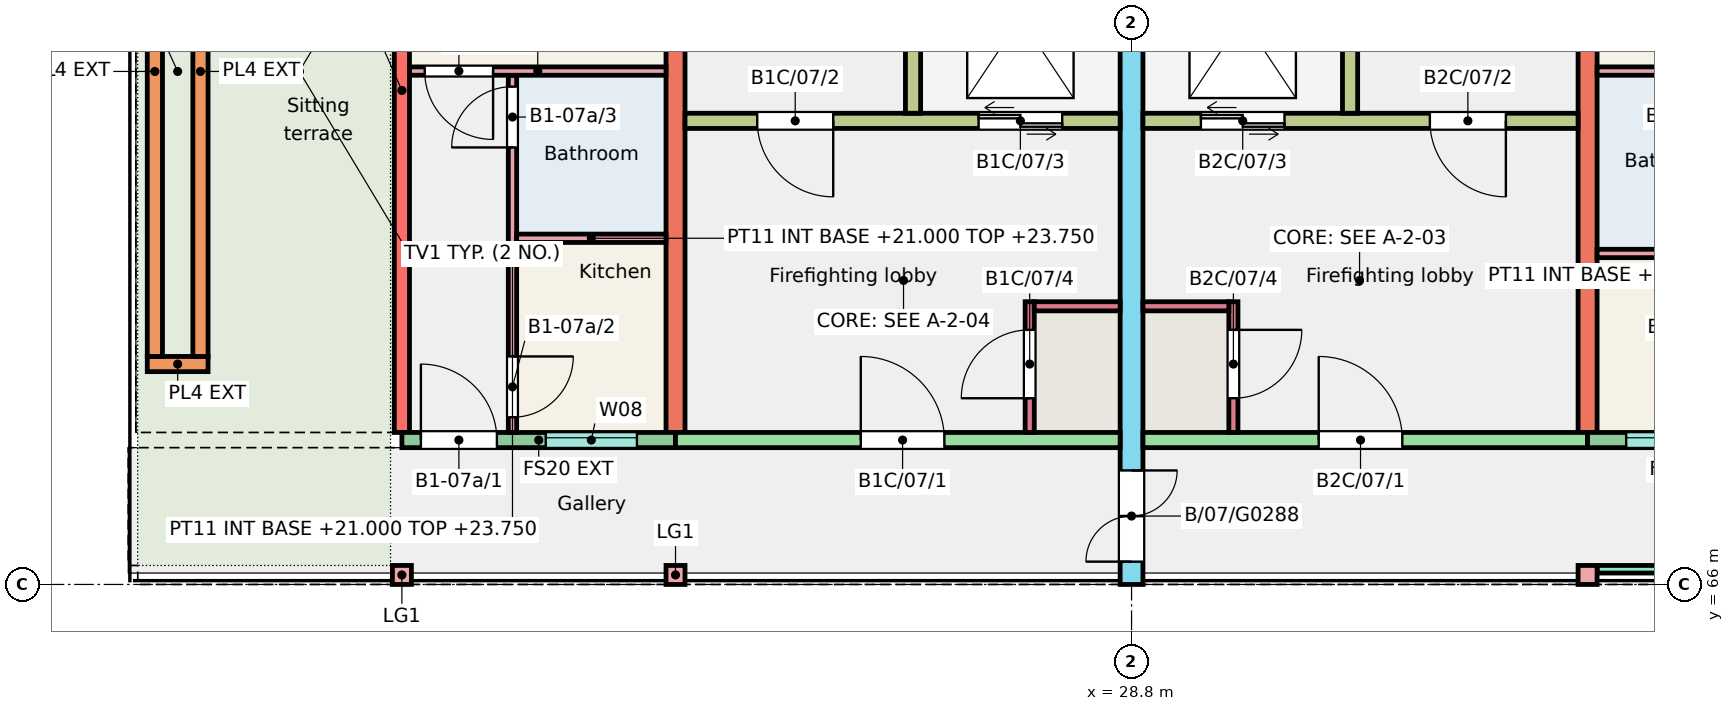
"""IFC4 building model, lengths in metres.
Left out: names, types, materials, properties, quantities, classifications, styles, units other than length and angle.
Written with IfcOpenShell. Run it as: python <this file> out.ifc"""

import sys

from ifc_helpers import new_model, si_unit, direction, frame, frame_2d, origin, origin_2d, place, context, subcontext, project, spatial, rectangle, extrude, element, fill, save


model = new_model("IFC4")
c1 = context("Model", 3, precision=1e-05, world=origin(), true_north=direction((0.0, 1.0)))
c2 = subcontext(c1, "Body", "Model", "MODEL_VIEW")
j1 = project(units=[si_unit("LENGTHUNIT", "METRE"), si_unit("PLANEANGLEUNIT", "RADIAN")], contexts=[c1])
p1 = place(None, origin())
s1 = spatial("IfcSite", under=j1, at=p1, CompositionType="ELEMENT")
p2 = place(p1, origin())
s2 = spatial("IfcBuilding", under=s1, at=p2, CompositionType="ELEMENT")
p3 = place(p2, frame((0.0, 0.0, 21.0)))
s3 = spatial("IfcBuildingStorey", under=s2, at=p3, CompositionType="ELEMENT", Elevation=21.0)
p4 = place(p3, frame((19.2, 68.0, 0.0), z_axis=(0.0, 0.0, 1.0), x_axis=(0.0, 1.0, 0.0)))
e1 = element("IfcWall", 1, at=p4, inside=s3, PredefinedType="SHEAR", context=c2, shape_type="SweptSolid", body=[
    extrude(rectangle(XDim=9.0, YDim=0.2, at=frame_2d((4.5, 0.0))), origin(), (0.0, 0.0, 1.0), 3.0),
])
p5 = place(p4, frame((7.653, 0.0, 0.9)))
e2 = element("IfcOpeningElement", 2, at=p5, cuts=e1, PredefinedType="OPENING", context=c2, shape_type="SweptSolid", body=[
    extrude(rectangle(XDim=1.2, YDim=1.5, at=frame_2d((0.6, 0.75))), frame((0.0, 0.11, 0.0), z_axis=(0.0, -1.0, 0.0), x_axis=(1.0, 0.0, 0.0)), (0.0, 0.0, 1.0), 0.22),
])
p6 = place(p4, frame((6.405, 0.0, 0.0)))
e3 = element("IfcOpeningElement", 3, at=p6, cuts=e1, PredefinedType="OPENING", context=c2, shape_type="SweptSolid", body=[
    extrude(rectangle(XDim=1.0, YDim=2.1, at=frame_2d((0.5, 1.05))), frame((0.0, 0.11, 0.0), z_axis=(0.0, -1.0, 0.0), x_axis=(1.0, 0.0, 0.0)), (0.0, 0.0, 1.0), 0.22),
])
p7 = place(p3, frame((22.8, 68.0, 0.0), z_axis=(0.0, 0.0, 1.0), x_axis=(0.0, 1.0, 0.0)))
e4 = element("IfcWall", 4, at=p7, inside=s3, PredefinedType="SHEAR", context=c2, shape_type="SweptSolid", body=[
    extrude(rectangle(XDim=9.0, YDim=0.25, at=frame_2d((4.5, 0.0))), origin(), (0.0, 0.0, 1.0), 3.0),
])
p8 = place(p3, frame((28.8, 66.0, 0.0), z_axis=(0.0, 0.0, 1.0), x_axis=(0.0, 1.0, 0.0)))
e5 = element("IfcWall", 5, at=p8, inside=s3, PredefinedType="SHEAR", context=c2, shape_type="SweptSolid", body=[
    extrude(rectangle(XDim=11.0, YDim=0.3, at=frame_2d((5.5, 0.0))), origin(), (0.0, 0.0, 1.0), 3.0),
])
p9 = place(p8, frame((0.3, 0.0, 0.0)))
e6 = element("IfcOpeningElement", 6, at=p9, cuts=e5, PredefinedType="OPENING", context=c2, shape_type="SweptSolid", body=[
    extrude(rectangle(XDim=1.2, YDim=2.1, at=frame_2d((0.6, 1.05))), frame((0.0, 0.16, 0.0), z_axis=(0.0, -1.0, 0.0), x_axis=(1.0, 0.0, 0.0)), (0.0, 0.0, 1.0), 0.32),
])
p10 = place(p3, frame((34.8, 68.0, 0.0), z_axis=(0.0, 0.0, 1.0), x_axis=(0.0, 1.0, 0.0)))
e7 = element("IfcWall", 7, at=p10, inside=s3, PredefinedType="SHEAR", context=c2, shape_type="SweptSolid", body=[
    extrude(rectangle(XDim=9.0, YDim=0.25, at=frame_2d((4.5, 0.0))), origin(), (0.0, 0.0, 1.0), 3.0),
])
p11 = place(p3, frame((19.2, 67.9, 0.0), z_axis=(0.0, 0.0, 1.0), x_axis=(1.0, 0.0, 0.0)))
e8 = element("IfcWall", 8, at=p11, inside=s3, PredefinedType="SOLIDWALL", context=c2, shape_type="SweptSolid", body=[
    extrude(rectangle(XDim=3.6, YDim=0.2, at=frame_2d((1.8, 0.0))), origin(), (0.0, 0.0, 1.0), 3.0),
])
p12 = place(p11, frame((1.893, 0.0, 1.1)))
e9 = element("IfcOpeningElement", 9, at=p12, cuts=e8, PredefinedType="OPENING", context=c2, shape_type="SweptSolid", body=[
    extrude(rectangle(XDim=1.2, YDim=1.3, at=frame_2d((0.6, 0.65))), frame((0.0, 0.11, 0.0), z_axis=(0.0, -1.0, 0.0), x_axis=(1.0, 0.0, 0.0)), (0.0, 0.0, 1.0), 0.22),
])
p13 = place(p11, frame((0.25, 0.0, 0.0)))
e10 = element("IfcOpeningElement", 10, at=p13, cuts=e8, PredefinedType="OPENING", context=c2, shape_type="SweptSolid", body=[
    extrude(rectangle(XDim=1.0, YDim=2.1, at=frame_2d((0.5, 1.05))), frame((0.0, 0.11, 0.0), z_axis=(0.0, -1.0, 0.0), x_axis=(1.0, 0.0, 0.0)), (0.0, 0.0, 1.0), 0.22),
])
p14 = place(p3, frame((22.8, 67.9, 0.0), z_axis=(0.0, 0.0, 1.0), x_axis=(1.0, 0.0, 0.0)))
e11 = element("IfcWall", 11, at=p14, inside=s3, PredefinedType="SHEAR", context=c2, shape_type="SweptSolid", body=[
    extrude(rectangle(XDim=5.85, YDim=0.2, at=frame_2d((2.925, 0.0))), origin(), (0.0, 0.0, 1.0), 3.0),
])
p15 = place(p14, frame((2.438, 0.0, 0.0)))
e12 = element("IfcOpeningElement", 12, at=p15, cuts=e11, PredefinedType="OPENING", context=c2, shape_type="SweptSolid", body=[
    extrude(rectangle(XDim=1.1, YDim=2.1, at=frame_2d((0.55, 1.05))), frame((0.0, 0.11, 0.0), z_axis=(0.0, -1.0, 0.0), x_axis=(1.0, 0.0, 0.0)), (0.0, 0.0, 1.0), 0.22),
])
p16 = place(p3, frame((22.925, 72.1, 0.0), z_axis=(0.0, 0.0, 1.0), x_axis=(1.0, 0.0, 0.0)))
e13 = element("IfcWall", 13, at=p16, inside=s3, PredefinedType="SHEAR", context=c2, shape_type="SweptSolid", body=[
    extrude(rectangle(XDim=5.725, YDim=0.2, at=frame_2d((2.862, 0.0))), origin(), (0.0, 0.0, 1.0), 3.0),
])
p17 = place(p16, frame((0.95, 0.0, 0.0)))
e14 = element("IfcOpeningElement", 14, at=p17, cuts=e13, PredefinedType="OPENING", context=c2, shape_type="SweptSolid", body=[
    extrude(rectangle(XDim=1.0, YDim=2.1, at=frame_2d((0.5, 1.05))), frame((0.0, 0.11, 0.0), z_axis=(0.0, -1.0, 0.0), x_axis=(1.0, 0.0, 0.0)), (0.0, 0.0, 1.0), 0.22),
])
p18 = place(p16, frame((3.863, 0.0, 0.0)))
e15 = element("IfcOpeningElement", 15, at=p18, cuts=e13, PredefinedType="OPENING", context=c2, shape_type="SweptSolid", body=[
    extrude(rectangle(XDim=1.1, YDim=2.1, at=frame_2d((0.55, 1.05))), frame((0.0, 0.11, 0.0), z_axis=(0.0, -1.0, 0.0), x_axis=(1.0, 0.0, 0.0)), (0.0, 0.0, 1.0), 0.22),
])
p19 = place(p3, frame((25.925, 72.2, 0.0), z_axis=(0.0, 0.0, 1.0), x_axis=(0.0, 1.0, 0.0)))
e16 = element("IfcWall", 16, at=p19, inside=s3, PredefinedType="SHEAR", context=c2, shape_type="SweptSolid", body=[
    extrude(rectangle(XDim=4.8, YDim=0.2, at=frame_2d((2.4, 0.0))), origin(), (0.0, 0.0, 1.0), 3.0),
])
p20 = place(p3, frame((27.46, 68.0, 0.0), z_axis=(0.0, 0.0, 1.0), x_axis=(0.0, 1.0, 0.0)))
e17 = element("IfcWall", 17, at=p20, inside=s3, PredefinedType="SHEAR", context=c2, shape_type="SweptSolid", body=[
    extrude(rectangle(XDim=1.72, YDim=0.12, at=frame_2d((0.86, 0.0))), origin(), (0.0, 0.0, 1.0), 3.0),
])
p21 = place(p20, frame((0.45, 0.0, 0.0)))
e18 = element("IfcOpeningElement", 18, at=p21, cuts=e17, PredefinedType="OPENING", context=c2, shape_type="SweptSolid", body=[
    extrude(rectangle(XDim=0.9, YDim=2.1, at=frame_2d((0.45, 1.05))), frame((0.0, 0.07, 0.0), z_axis=(0.0, -1.0, 0.0), x_axis=(1.0, 0.0, 0.0)), (0.0, 0.0, 1.0), 0.14),
])
p22 = place(p3, frame((27.52, 69.66, 0.0), z_axis=(0.0, 0.0, 1.0), x_axis=(1.0, 0.0, 0.0)))
e19 = element("IfcWall", 19, at=p22, inside=s3, PredefinedType="SHEAR", context=c2, shape_type="SweptSolid", body=[
    extrude(rectangle(XDim=1.13, YDim=0.12, at=frame_2d((0.565, 0.0))), origin(), (0.0, 0.0, 1.0), 3.0),
])
p23 = place(p3, frame((28.95, 67.9, 0.0), z_axis=(0.0, 0.0, 1.0), x_axis=(1.0, 0.0, 0.0)))
e20 = element("IfcWall", 20, at=p23, inside=s3, PredefinedType="SHEAR", context=c2, shape_type="SweptSolid", body=[
    extrude(rectangle(XDim=5.85, YDim=0.2, at=frame_2d((2.925, 0.0))), origin(), (0.0, 0.0, 1.0), 3.0),
])
p24 = place(p23, frame((2.312, 0.0, 0.0)))
e21 = element("IfcOpeningElement", 21, at=p24, cuts=e20, PredefinedType="OPENING", context=c2, shape_type="SweptSolid", body=[
    extrude(rectangle(XDim=1.1, YDim=2.1, at=frame_2d((0.55, 1.05))), frame((0.0, 0.11, 0.0), z_axis=(0.0, -1.0, 0.0), x_axis=(1.0, 0.0, 0.0)), (0.0, 0.0, 1.0), 0.22),
])
p25 = place(p3, frame((28.95, 72.1, 0.0), z_axis=(0.0, 0.0, 1.0), x_axis=(1.0, 0.0, 0.0)))
e22 = element("IfcWall", 22, at=p25, inside=s3, PredefinedType="SHEAR", context=c2, shape_type="SweptSolid", body=[
    extrude(rectangle(XDim=5.725, YDim=0.2, at=frame_2d((2.863, 0.0))), origin(), (0.0, 0.0, 1.0), 3.0),
])
p26 = place(p25, frame((3.775, 0.0, 0.0)))
e23 = element("IfcOpeningElement", 23, at=p26, cuts=e22, PredefinedType="OPENING", context=c2, shape_type="SweptSolid", body=[
    extrude(rectangle(XDim=1.0, YDim=2.1, at=frame_2d((0.5, 1.05))), frame((0.0, 0.11, 0.0), z_axis=(0.0, -1.0, 0.0), x_axis=(1.0, 0.0, 0.0)), (0.0, 0.0, 1.0), 0.22),
])
p27 = place(p25, frame((0.762, 0.0, 0.0)))
e24 = element("IfcOpeningElement", 24, at=p27, cuts=e22, PredefinedType="OPENING", context=c2, shape_type="SweptSolid", body=[
    extrude(rectangle(XDim=1.1, YDim=2.1, at=frame_2d((0.55, 1.05))), frame((0.0, 0.11, 0.0), z_axis=(0.0, -1.0, 0.0), x_axis=(1.0, 0.0, 0.0)), (0.0, 0.0, 1.0), 0.22),
])
p28 = place(p3, frame((31.675, 72.2, 0.0), z_axis=(0.0, 0.0, 1.0), x_axis=(0.0, 1.0, 0.0)))
e25 = element("IfcWall", 25, at=p28, inside=s3, PredefinedType="SHEAR", context=c2, shape_type="SweptSolid", body=[
    extrude(rectangle(XDim=4.8, YDim=0.2, at=frame_2d((2.4, 0.0))), origin(), (0.0, 0.0, 1.0), 3.0),
])
p29 = place(p3, frame((30.14, 68.0, 0.0), z_axis=(0.0, 0.0, 1.0), x_axis=(0.0, 1.0, 0.0)))
e26 = element("IfcWall", 26, at=p29, inside=s3, PredefinedType="SHEAR", context=c2, shape_type="SweptSolid", body=[
    extrude(rectangle(XDim=1.72, YDim=0.12, at=frame_2d((0.86, 0.0))), origin(), (0.0, 0.0, 1.0), 3.0),
])
p30 = place(p29, frame((0.45, 0.0, 0.0)))
e27 = element("IfcOpeningElement", 27, at=p30, cuts=e26, PredefinedType="OPENING", context=c2, shape_type="SweptSolid", body=[
    extrude(rectangle(XDim=0.9, YDim=2.1, at=frame_2d((0.45, 1.05))), frame((0.0, 0.07, 0.0), z_axis=(0.0, -1.0, 0.0), x_axis=(1.0, 0.0, 0.0)), (0.0, 0.0, 1.0), 0.14),
])
p31 = place(p3, frame((28.95, 69.66, 0.0), z_axis=(0.0, 0.0, 1.0), x_axis=(1.0, 0.0, 0.0)))
e28 = element("IfcWall", 28, at=p31, inside=s3, PredefinedType="SHEAR", context=c2, shape_type="SweptSolid", body=[
    extrude(rectangle(XDim=1.13, YDim=0.12, at=frame_2d((0.565, 0.0))), origin(), (0.0, 0.0, 1.0), 3.0),
])
p32 = place(p3, frame((34.8, 67.9, 0.0), z_axis=(0.0, 0.0, 1.0), x_axis=(1.0, 0.0, 0.0)))
e29 = element("IfcWall", 29, at=p32, inside=s3, PredefinedType="SOLIDWALL", context=c2, shape_type="SweptSolid", body=[
    extrude(rectangle(XDim=3.6, YDim=0.2, at=frame_2d((1.8, 0.0))), origin(), (0.0, 0.0, 1.0), 3.0),
])
p33 = place(p32, frame((0.508, 0.0, 1.1)))
e30 = element("IfcOpeningElement", 30, at=p33, cuts=e29, PredefinedType="OPENING", context=c2, shape_type="SweptSolid", body=[
    extrude(rectangle(XDim=1.2, YDim=1.3, at=frame_2d((0.6, 0.65))), frame((0.0, 0.11, 0.0), z_axis=(0.0, -1.0, 0.0), x_axis=(1.0, 0.0, 0.0)), (0.0, 0.0, 1.0), 0.22),
])
p34 = place(p32, frame((2.35, 0.0, 0.0)))
e31 = element("IfcOpeningElement", 31, at=p34, cuts=e29, PredefinedType="OPENING", context=c2, shape_type="SweptSolid", body=[
    extrude(rectangle(XDim=1.0, YDim=2.1, at=frame_2d((0.5, 1.05))), frame((0.0, 0.11, 0.0), z_axis=(0.0, -1.0, 0.0), x_axis=(1.0, 0.0, 0.0)), (0.0, 0.0, 1.0), 0.22),
])
for number, where, z_axis, x_axis in (
    (32, (19.2, 66.125, 0.0), (0.0, 0.0, 1.0), (1.0, 0.0, 0.0)),
    (33, (22.8, 66.125, 0.0), (0.0, 0.0, 1.0), (1.0, 0.0, 0.0)),
    (34, (34.8, 66.125, 0.0), (0.0, 0.0, 1.0), (1.0, 0.0, 0.0)),
):
    element("IfcColumn", number, at=place(p3, frame(where, z_axis=z_axis, x_axis=x_axis)), inside=s3, PredefinedType="COLUMN", context=c2, shape_type="SweptSolid", body=[
        extrude(rectangle(XDim=0.25, YDim=0.25, at=origin_2d()), origin(), (0.0, 0.0, 1.0), 3.0),
    ])
p35 = place(p3, frame((15.85, 68.9, 0.01), z_axis=(0.0, 0.0, 1.0), x_axis=(1.0, 0.0, 0.0)))
e35 = element("IfcWall", 35, at=p35, inside=s3, PredefinedType="SOLIDWALL", context=c2, shape_type="SweptSolid", body=[
    extrude(rectangle(XDim=0.8, YDim=0.2, at=frame_2d((0.4, 0.0))), origin(), (0.0, 0.0, 1.0), 0.45),
])
for number, where, z_axis, x_axis in (
    (36, (15.95, 69.0, 0.01), (0.0, 0.0, 1.0), (0.0, 1.0, 0.0)),
    (37, (16.55, 69.0, 0.01), (0.0, 0.0, 1.0), (0.0, 1.0, 0.0)),
):
    element("IfcWall", number, at=place(p3, frame(where, z_axis=z_axis, x_axis=x_axis)), inside=s3, PredefinedType="SOLIDWALL", context=c2, shape_type="SweptSolid", body=[
        extrude(rectangle(XDim=7.5, YDim=0.2, at=frame_2d((3.75, 0.0))), origin(), (0.0, 0.0, 1.0), 0.45),
    ])
p36 = place(p3, frame((34.925, 66.2, 0.0), z_axis=(0.0, 0.0, 1.0), x_axis=(1.0, 0.0, 0.0)))
e38 = element("IfcWall", 38, at=p36, inside=s3, PredefinedType="SOLIDWALL", context=c2, shape_type="SweptSolid", body=[
    extrude(rectangle(XDim=3.35, YDim=0.1, at=frame_2d((1.675, 0.0))), origin(), (0.0, 0.0, 1.0), 2.45),
])
p37 = place(p3, frame((20.655, 68.0, 0.0), z_axis=(0.0, 0.0, 1.0), x_axis=(0.0, 1.0, 0.0)))
e39 = element("IfcWall", 39, at=p37, inside=s3, PredefinedType="PARTITIONING", context=c2, shape_type="SweptSolid", body=[
    extrude(rectangle(XDim=4.7, YDim=0.11, at=frame_2d((2.35, 0.0))), origin(), (0.0, 0.0, 1.0), 2.75),
])
p38 = place(p37, frame((0.2, 0.0, 0.0)))
e40 = element("IfcOpeningElement", 40, at=p38, cuts=e39, PredefinedType="OPENING", context=c2, shape_type="SweptSolid", body=[
    extrude(rectangle(XDim=0.8, YDim=2.1, at=frame_2d((0.4, 1.05))), frame((0.0, 0.065, 0.0), z_axis=(0.0, -1.0, 0.0), x_axis=(1.0, 0.0, 0.0)), (0.0, 0.0, 1.0), 0.13),
])
p39 = place(p37, frame((3.75, 0.0, 0.0)))
e41 = element("IfcOpeningElement", 41, at=p39, cuts=e39, PredefinedType="OPENING", context=c2, shape_type="SweptSolid", body=[
    extrude(rectangle(XDim=0.8, YDim=2.1, at=frame_2d((0.4, 1.05))), frame((0.0, 0.065, 0.0), z_axis=(0.0, -1.0, 0.0), x_axis=(1.0, 0.0, 0.0)), (0.0, 0.0, 1.0), 0.13),
])
p40 = place(p3, frame((20.71, 70.555, 0.0), z_axis=(0.0, 0.0, 1.0), x_axis=(1.0, 0.0, 0.0)))
e42 = element("IfcWall", 42, at=p40, inside=s3, PredefinedType="PARTITIONING", context=c2, shape_type="SweptSolid", body=[
    extrude(rectangle(XDim=1.965, YDim=0.11, at=frame_2d((0.982, 0.0))), origin(), (0.0, 0.0, 1.0), 2.75),
])
p41 = place(p3, frame((19.3, 72.755, 0.0), z_axis=(0.0, 0.0, 1.0), x_axis=(1.0, 0.0, 0.0)))
e43 = element("IfcWall", 43, at=p41, inside=s3, PredefinedType="PARTITIONING", context=c2, shape_type="SweptSolid", body=[
    extrude(rectangle(XDim=3.375, YDim=0.11, at=frame_2d((1.688, 0.0))), origin(), (0.0, 0.0, 1.0), 2.75),
])
p42 = place(p41, frame((0.2, 0.0, 0.0)))
e44 = element("IfcOpeningElement", 44, at=p42, cuts=e43, PredefinedType="OPENING", context=c2, shape_type="SweptSolid", body=[
    extrude(rectangle(XDim=0.9, YDim=2.1, at=frame_2d((0.45, 1.05))), frame((0.0, 0.065, 0.0), z_axis=(0.0, -1.0, 0.0), x_axis=(1.0, 0.0, 0.0)), (0.0, 0.0, 1.0), 0.13),
])
p43 = place(p3, frame((34.925, 70.355, 0.0), z_axis=(0.0, 0.0, 1.0), x_axis=(1.0, 0.0, 0.0)))
e45 = element("IfcWall", 45, at=p43, inside=s3, PredefinedType="PARTITIONING", context=c2, shape_type="SweptSolid", body=[
    extrude(rectangle(XDim=1.965, YDim=0.11, at=frame_2d((0.982, 0.0))), origin(), (0.0, 0.0, 1.0), 2.8),
])
p44 = place(p3, frame((34.925, 72.755, 0.0), z_axis=(0.0, 0.0, 1.0), x_axis=(1.0, 0.0, 0.0)))
e46 = element("IfcWall", 46, at=p44, inside=s3, PredefinedType="PARTITIONING", context=c2, shape_type="SweptSolid", body=[
    extrude(rectangle(XDim=3.375, YDim=0.11, at=frame_2d((1.688, 0.0))), origin(), (0.0, 0.0, 1.0), 2.8),
])
p45 = place(p44, frame((2.275, 0.0, 0.0)))
e47 = element("IfcOpeningElement", 47, at=p45, cuts=e46, PredefinedType="OPENING", context=c2, shape_type="SweptSolid", body=[
    extrude(rectangle(XDim=0.9, YDim=2.1, at=frame_2d((0.45, 1.05))), frame((0.0, 0.065, 0.0), z_axis=(0.0, -1.0, 0.0), x_axis=(1.0, 0.0, 0.0)), (0.0, 0.0, 1.0), 0.13),
])
p46 = place(p12, origin())
e48 = element("IfcWindow", 48, at=p46, inside=s3, PartitioningType="SINGLE_PANEL", PredefinedType="WINDOW", context=c2, shape_type="SweptSolid", body=[
    extrude(rectangle(XDim=1.2, YDim=1.3, at=frame_2d((0.6, 0.65))), frame((0.0, 0.06, 0.0), z_axis=(0.0, -1.0, 0.0), x_axis=(1.0, 0.0, 0.0)), (0.0, 0.0, 1.0), 0.06),
])
fill(e9, e48)
p47 = place(p33, origin())
e49 = element("IfcWindow", 49, at=p47, inside=s3, PartitioningType="SINGLE_PANEL", PredefinedType="WINDOW", context=c2, shape_type="SweptSolid", body=[
    extrude(rectangle(XDim=1.2, YDim=1.3, at=frame_2d((0.6, 0.65))), frame((0.0, 0.06, 0.0), z_axis=(0.0, -1.0, 0.0), x_axis=(1.0, 0.0, 0.0)), (0.0, 0.0, 1.0), 0.06),
])
fill(e30, e49)
p48 = place(p13, origin())
e50 = element("IfcDoor", 50, at=p48, inside=s3, OperationType="SINGLE_SWING_LEFT", PredefinedType="DOOR", context=c2, shape_type="SweptSolid", body=[
    extrude(rectangle(XDim=1.0, YDim=2.1, at=frame_2d((0.5, 1.05))), frame((0.0, 0.025, 0.0), z_axis=(0.0, -1.0, 0.0), x_axis=(1.0, 0.0, 0.0)), (0.0, 0.0, 1.0), 0.05),
])
fill(e10, e50)
p49 = place(p38, origin())
e51 = element("IfcDoor", 51, at=p49, inside=s3, OperationType="SINGLE_SWING_RIGHT", PredefinedType="DOOR", context=c2, shape_type="SweptSolid", body=[
    extrude(rectangle(XDim=0.8, YDim=2.1, at=frame_2d((0.4, 1.05))), frame((0.0, 0.025, 0.0), z_axis=(0.0, -1.0, 0.0), x_axis=(1.0, 0.0, 0.0)), (0.0, 0.0, 1.0), 0.05),
])
fill(e40, e51)
p50 = place(p39, origin())
e52 = element("IfcDoor", 52, at=p50, inside=s3, OperationType="SINGLE_SWING_LEFT", PredefinedType="DOOR", context=c2, shape_type="SweptSolid", body=[
    extrude(rectangle(XDim=0.8, YDim=2.1, at=frame_2d((0.4, 1.05))), frame((0.0, 0.025, 0.0), z_axis=(0.0, -1.0, 0.0), x_axis=(1.0, 0.0, 0.0)), (0.0, 0.0, 1.0), 0.05),
])
fill(e41, e52)
p51 = place(p42, origin())
e53 = element("IfcDoor", 53, at=p51, inside=s3, OperationType="SINGLE_SWING_RIGHT", PredefinedType="DOOR", context=c2, shape_type="SweptSolid", body=[
    extrude(rectangle(XDim=0.9, YDim=2.1, at=frame_2d((0.45, 1.05))), frame((0.0, 0.025, 0.0), z_axis=(0.0, -1.0, 0.0), x_axis=(1.0, 0.0, 0.0)), (0.0, 0.0, 1.0), 0.05),
])
fill(e44, e53)
p52 = place(p15, origin())
e54 = element("IfcDoor", 54, at=p52, inside=s3, OperationType="SINGLE_SWING_LEFT", PredefinedType="DOOR", context=c2, shape_type="SweptSolid", body=[
    extrude(rectangle(XDim=1.1, YDim=2.1, at=frame_2d((0.55, 1.05))), frame((0.0, 0.025, 0.0), z_axis=(0.0, -1.0, 0.0), x_axis=(1.0, 0.0, 0.0)), (0.0, 0.0, 1.0), 0.05),
])
fill(e12, e54)
p53 = place(p17, origin())
e55 = element("IfcDoor", 55, at=p53, inside=s3, OperationType="SINGLE_SWING_RIGHT", PredefinedType="DOOR", context=c2, shape_type="SweptSolid", body=[
    extrude(rectangle(XDim=1.0, YDim=2.1, at=frame_2d((0.5, 1.05))), frame((0.0, 0.025, 0.0), z_axis=(0.0, -1.0, 0.0), x_axis=(1.0, 0.0, 0.0)), (0.0, 0.0, 1.0), 0.05),
])
fill(e14, e55)
p54 = place(p18, origin())
e56 = element("IfcDoor", 56, at=p54, inside=s3, OperationType="DOUBLE_DOOR_SLIDING", PredefinedType="DOOR", context=c2, shape_type="SweptSolid", body=[
    extrude(rectangle(XDim=1.1, YDim=2.1, at=frame_2d((0.55, 1.05))), frame((0.0, 0.025, 0.0), z_axis=(0.0, -1.0, 0.0), x_axis=(1.0, 0.0, 0.0)), (0.0, 0.0, 1.0), 0.05),
])
fill(e15, e56)
p55 = place(p21, origin())
e57 = element("IfcDoor", 57, at=p55, inside=s3, OperationType="SINGLE_SWING_LEFT", PredefinedType="DOOR", context=c2, shape_type="SweptSolid", body=[
    extrude(rectangle(XDim=0.9, YDim=2.1, at=frame_2d((0.45, 1.05))), frame((0.0, 0.025, 0.0), z_axis=(0.0, -1.0, 0.0), x_axis=(1.0, 0.0, 0.0)), (0.0, 0.0, 1.0), 0.05),
])
fill(e18, e57)
p56 = place(p24, origin())
e58 = element("IfcDoor", 58, at=p56, inside=s3, OperationType="SINGLE_SWING_LEFT", PredefinedType="DOOR", context=c2, shape_type="SweptSolid", body=[
    extrude(rectangle(XDim=1.1, YDim=2.1, at=frame_2d((0.55, 1.05))), frame((0.0, 0.025, 0.0), z_axis=(0.0, -1.0, 0.0), x_axis=(1.0, 0.0, 0.0)), (0.0, 0.0, 1.0), 0.05),
])
fill(e21, e58)
p57 = place(p26, origin())
e59 = element("IfcDoor", 59, at=p57, inside=s3, OperationType="SINGLE_SWING_RIGHT", PredefinedType="DOOR", context=c2, shape_type="SweptSolid", body=[
    extrude(rectangle(XDim=1.0, YDim=2.1, at=frame_2d((0.5, 1.05))), frame((0.0, 0.025, 0.0), z_axis=(0.0, -1.0, 0.0), x_axis=(1.0, 0.0, 0.0)), (0.0, 0.0, 1.0), 0.05),
])
fill(e23, e59)
p58 = place(p27, origin())
e60 = element("IfcDoor", 60, at=p58, inside=s3, OperationType="DOUBLE_DOOR_SLIDING", PredefinedType="DOOR", context=c2, shape_type="SweptSolid", body=[
    extrude(rectangle(XDim=1.1, YDim=2.1, at=frame_2d((0.55, 1.05))), frame((0.0, 0.025, 0.0), z_axis=(0.0, -1.0, 0.0), x_axis=(1.0, 0.0, 0.0)), (0.0, 0.0, 1.0), 0.05),
])
fill(e24, e60)
p59 = place(p30, origin())
e61 = element("IfcDoor", 61, at=p59, inside=s3, OperationType="SINGLE_SWING_RIGHT", PredefinedType="DOOR", context=c2, shape_type="SweptSolid", body=[
    extrude(rectangle(XDim=0.9, YDim=2.1, at=frame_2d((0.45, 1.05))), frame((0.0, 0.025, 0.0), z_axis=(0.0, -1.0, 0.0), x_axis=(1.0, 0.0, 0.0)), (0.0, 0.0, 1.0), 0.05),
])
fill(e27, e61)
p60 = place(p9, origin())
e62 = element("IfcDoor", 62, at=p60, inside=s3, OperationType="DOUBLE_DOOR_SINGLE_SWING", PredefinedType="DOOR", context=c2, shape_type="SweptSolid", body=[
    extrude(rectangle(XDim=1.2, YDim=2.1, at=frame_2d((0.6, 1.05))), frame((0.0, 0.025, 0.0), z_axis=(0.0, -1.0, 0.0), x_axis=(1.0, 0.0, 0.0)), (0.0, 0.0, 1.0), 0.05),
])
fill(e6, e62)
save(model, sys.argv[1])
